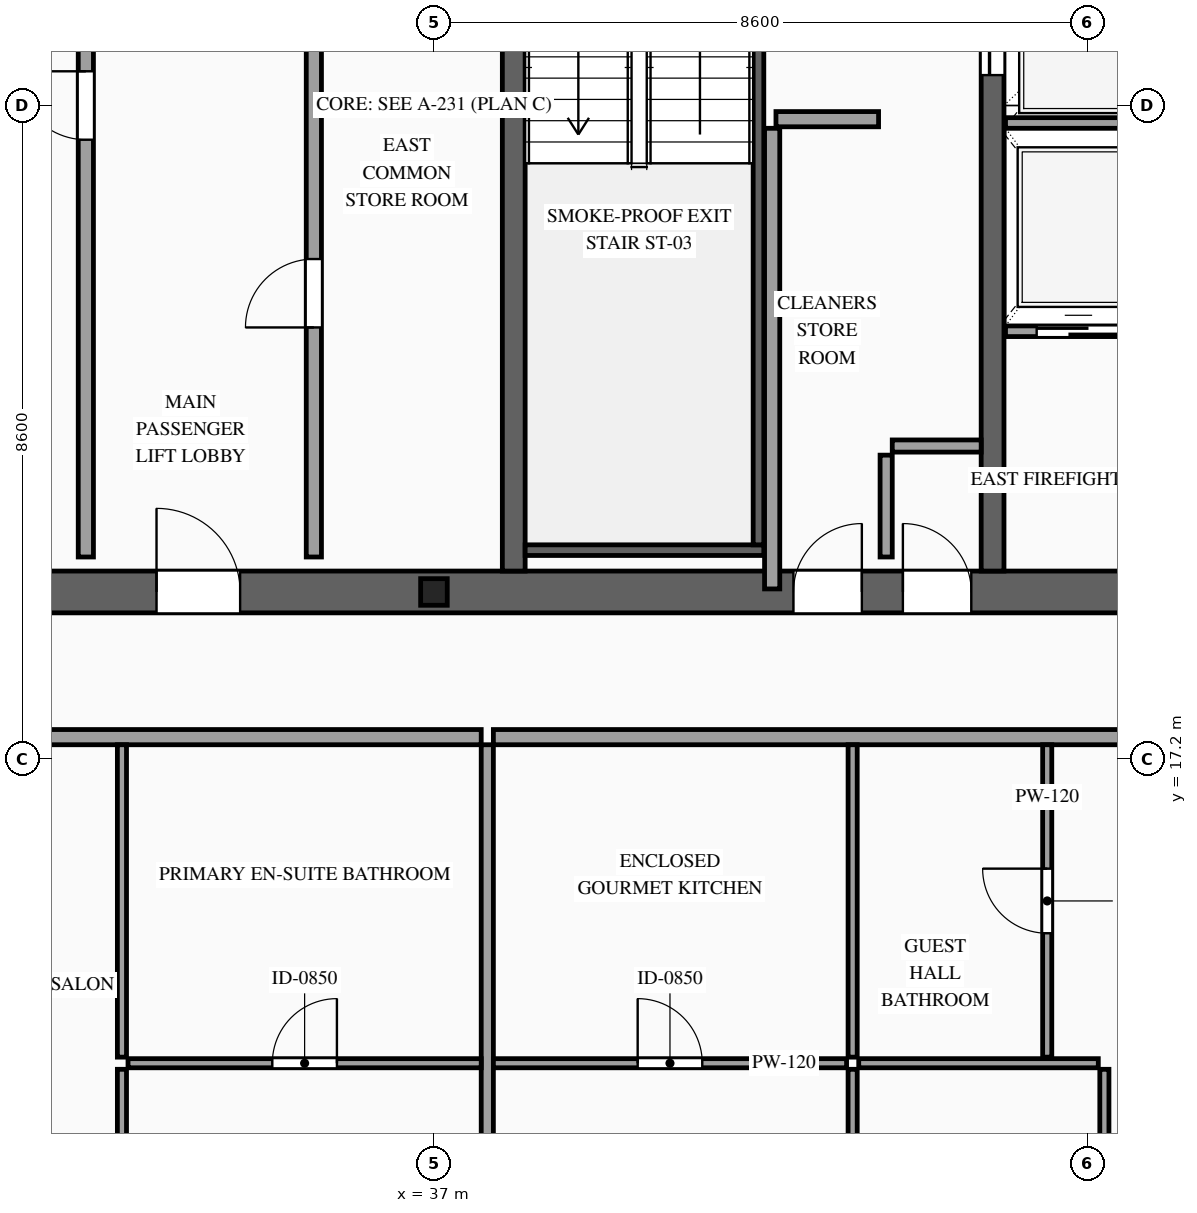
"""IFC4 building model, lengths in metres.
Left out: names, types, materials, properties, quantities, classifications, styles, units other than length and angle.
Written with IfcOpenShell. Run it as: python <this file> out.ifc"""

import sys

from ifc_helpers import new_model, si_unit, direction, frame, frame_2d, origin, origin_2d, place, context, subcontext, project, spatial, rectangle, i_section, extrude, source, transform, mapped, element, fill, save


model = new_model("IFC4")
c1 = context("Model", 3, precision=1e-05, world=origin(), true_north=direction((0.0, 1.0)))
c2 = subcontext(c1, "Body", "Model", "MODEL_VIEW")
j1 = project(units=[si_unit("LENGTHUNIT", "METRE"), si_unit("PLANEANGLEUNIT", "RADIAN")], contexts=[c1])
p1 = place(None, origin())
s1 = spatial("IfcSite", under=j1, at=p1, CompositionType="ELEMENT")
p2 = place(p1, origin())
s2 = spatial("IfcBuilding", under=s1, at=p2, CompositionType="ELEMENT")
p3 = place(p2, frame((0.0, 0.0, 282.1)))
s3 = spatial("IfcBuildingStorey", under=s2, at=p3, CompositionType="ELEMENT", Elevation=282.1)
p4 = place(p3, frame((23.525, 19.4, 0.0), z_axis=(0.0, 0.0, 1.0), x_axis=(1.0, 0.0, 0.0)))
e1 = element("IfcWall", 1, at=p4, inside=s3, PredefinedType="SHEAR", context=c2, shape_type="SweptSolid", body=[
    extrude(rectangle(XDim=26.95, YDim=0.55, at=frame_2d((13.475, 0.0))), origin(), (0.0, 0.0, 1.0), 3.5),
])
p5 = place(p4, frame((1.925, 0.0, 0.0)))
e2 = element("IfcOpeningElement", 2, at=p5, cuts=e1, PredefinedType="OPENING", context=c2, shape_type="SweptSolid", body=[
    extrude(rectangle(XDim=1.1, YDim=2.2, at=frame_2d((0.55, 1.1))), frame((0.0, 0.29, 0.0), z_axis=(0.0, -1.0, 0.0), x_axis=(1.0, 0.0, 0.0)), (0.0, 0.0, 1.0), 0.58),
])
p6 = place(p4, frame((9.825, 0.0, 0.0)))
e3 = element("IfcOpeningElement", 3, at=p6, cuts=e1, PredefinedType="OPENING", context=c2, shape_type="SweptSolid", body=[
    extrude(rectangle(XDim=1.1, YDim=2.2, at=frame_2d((0.55, 1.1))), frame((0.0, 0.29, 0.0), z_axis=(0.0, -1.0, 0.0), x_axis=(1.0, 0.0, 0.0)), (0.0, 0.0, 1.0), 0.58),
])
p7 = place(p4, frame((23.025, 0.0, 0.0)))
e4 = element("IfcOpeningElement", 4, at=p7, cuts=e1, PredefinedType="OPENING", context=c2, shape_type="SweptSolid", body=[
    extrude(rectangle(XDim=1.1, YDim=2.2, at=frame_2d((0.55, 1.1))), frame((0.0, 0.29, 0.0), z_axis=(0.0, -1.0, 0.0), x_axis=(1.0, 0.0, 0.0)), (0.0, 0.0, 1.0), 0.58),
])
p8 = place(p4, frame((19.645, 0.0, 0.0)))
e5 = element("IfcOpeningElement", 5, at=p8, cuts=e1, PredefinedType="OPENING", context=c2, shape_type="SweptSolid", body=[
    extrude(rectangle(XDim=0.9, YDim=2.15, at=frame_2d((0.45, 1.075))), frame((0.0, 0.29, 0.0), z_axis=(0.0, -1.0, 0.0), x_axis=(1.0, 0.0, 0.0)), (0.0, 0.0, 1.0), 0.58),
])
p9 = place(p4, frame((18.205, 0.0, 0.0)))
e6 = element("IfcOpeningElement", 6, at=p9, cuts=e1, PredefinedType="OPENING", context=c2, shape_type="SweptSolid", body=[
    extrude(rectangle(XDim=0.9, YDim=2.15, at=frame_2d((0.45, 1.075))), frame((0.0, 0.29, 0.0), z_axis=(0.0, -1.0, 0.0), x_axis=(1.0, 0.0, 0.0)), (0.0, 0.0, 1.0), 0.58),
])
m1 = source(origin(), c2, "Body", "SweptSolid", [
    extrude(rectangle(XDim=12.25, YDim=0.3, at=frame_2d((6.125, 0.0))), origin(), (0.0, 0.0, 1.0), 3.5),
])
p10 = place(p3, frame((38.05, 19.675, 0.0), z_axis=(0.0, 0.0, 1.0), x_axis=(0.0, 1.0, 0.0)))
e7 = element("IfcWall", 7, at=p10, inside=s3, PredefinedType="SOLIDWALL", context=c2, shape_type="MappedRepresentation", body=[
    mapped(m1, transform((0.0, 0.0, 0.0), scale=1.0)),
])
p11 = place(p3, frame((44.35, 19.675, 0.0), z_axis=(0.0, 0.0, 1.0), x_axis=(0.0, 1.0, 0.0)))
e8 = element("IfcWall", 8, at=p11, inside=s3, PredefinedType="SOLIDWALL", context=c2, shape_type="SweptSolid", body=[
    extrude(rectangle(XDim=12.25, YDim=0.3, at=frame_2d((6.125, 0.0))), origin(), (0.0, 0.0, 1.0), 3.5),
])
p12 = place(p11, frame((6.525, 0.0, 0.0)))
e9 = element("IfcOpeningElement", 9, at=p12, cuts=e8, PredefinedType="OPENING", context=c2, shape_type="SweptSolid", body=[
    extrude(rectangle(XDim=1.1, YDim=2.2, at=frame_2d((0.55, 1.1))), frame((0.0, 0.165, 0.0), z_axis=(0.0, -1.0, 0.0), x_axis=(1.0, 0.0, 0.0)), (0.0, 0.0, 1.0), 0.33),
])
p13 = place(p11, frame((8.625, 0.0, 0.0)))
e10 = element("IfcOpeningElement", 10, at=p13, cuts=e8, PredefinedType="OPENING", context=c2, shape_type="SweptSolid", body=[
    extrude(rectangle(XDim=1.1, YDim=2.2, at=frame_2d((0.55, 1.1))), frame((0.0, 0.165, 0.0), z_axis=(0.0, -1.0, 0.0), x_axis=(1.0, 0.0, 0.0)), (0.0, 0.0, 1.0), 0.33),
])
p14 = place(p11, frame((10.725, 0.0, 0.0)))
e11 = element("IfcOpeningElement", 11, at=p14, cuts=e8, PredefinedType="OPENING", context=c2, shape_type="SweptSolid", body=[
    extrude(rectangle(XDim=1.1, YDim=2.2, at=frame_2d((0.55, 1.1))), frame((0.0, 0.165, 0.0), z_axis=(0.0, -1.0, 0.0), x_axis=(1.0, 0.0, 0.0)), (0.0, 0.0, 1.0), 0.33),
])
m2 = source(origin(), c2, "Body", "SweptSolid", [
    extrude(i_section(OverallWidth=0.35, OverallDepth=0.35, WebThickness=0.012, FlangeThickness=0.019, at=origin_2d()), origin(), (0.0, 0.0, 1.0), 3.5),
])
p15 = place(p3, frame((37.0, 19.4, 0.0), z_axis=(0.0, 0.0, 1.0), x_axis=(1.0, 0.0, 0.0)))
e12 = element("IfcColumn", 12, at=p15, inside=s3, PredefinedType="COLUMN", context=c2, shape_type="MappedRepresentation", body=[
    mapped(m2, transform((0.0, 0.0, 0.0), scale=1.0)),
])
p16 = place(p3, frame((44.52, 22.83, 0.0), z_axis=(0.0, 0.0, 1.0), x_axis=(1.0, 0.0, 0.0)))
e13 = element("IfcWall", 13, at=p16, inside=s3, PredefinedType="SOLIDWALL", context=c2, shape_type="SweptSolid", body=[
    extrude(rectangle(XDim=1.92, YDim=0.14, at=frame_2d((0.96, 0.0))), origin(), (0.0, 0.0, 1.0), 3.28),
])
p17 = place(p16, frame((0.41, 0.0, 0.0)))
e14 = element("IfcOpeningElement", 14, at=p17, cuts=e13, PredefinedType="OPENING", context=c2, shape_type="SweptSolid", body=[
    extrude(rectangle(XDim=1.1, YDim=2.2, at=frame_2d((0.55, 1.1))), frame((0.0, 0.085, 0.0), z_axis=(0.0, -1.0, 0.0), x_axis=(1.0, 0.0, 0.0)), (0.0, 0.0, 1.0), 0.17),
])
m3 = source(origin(), c2, "Body", "SweptSolid", [
    extrude(rectangle(XDim=1.92, YDim=0.14, at=frame_2d((0.96, 0.0))), origin(), (0.0, 0.0, 1.0), 3.28),
])
p18 = place(p3, frame((44.52, 25.57, 0.0), z_axis=(0.0, 0.0, 1.0), x_axis=(1.0, 0.0, 0.0)))
e15 = element("IfcWall", 15, at=p18, inside=s3, PredefinedType="SOLIDWALL", context=c2, shape_type="MappedRepresentation", body=[
    mapped(m3, transform((0.0, 0.0, 0.0), scale=1.0)),
])
m4 = source(origin(), c2, "Body", "SweptSolid", [
    extrude(rectangle(XDim=3.14, YDim=0.14, at=frame_2d((1.57, 0.0))), origin(), (0.0, 0.0, 1.0), 3.28),
])
p19 = place(p3, frame((38.2, 19.95, 0.0), z_axis=(0.0, 0.0, 1.0), x_axis=(1.0, 0.0, 0.0)))
e16 = element("IfcWall", 16, at=p19, inside=s3, PredefinedType="SOLIDWALL", context=c2, shape_type="MappedRepresentation", body=[
    mapped(m4, transform((0.0, 0.0, 0.0), scale=1.0)),
])
m5 = source(origin(), c2, "Body", "SweptSolid", [
    extrude(rectangle(XDim=8.94, YDim=0.14, at=frame_2d((4.47, 0.0))), origin(), (0.0, 0.0, 1.0), 3.28),
])
p20 = place(p3, frame((41.27, 20.02, 0.0), z_axis=(0.0, 0.0, 1.0), x_axis=(0.0, 1.0, 0.0)))
e17 = element("IfcWall", 17, at=p20, inside=s3, PredefinedType="SOLIDWALL", context=c2, shape_type="MappedRepresentation", body=[
    mapped(m5, transform((0.0, 0.0, 0.0), scale=1.0)),
])
p21 = place(p3, frame((32.42, 19.86, 0.0), z_axis=(0.0, 0.0, 1.0), x_axis=(0.0, 1.0, 0.0)))
e18 = element("IfcWall", 18, at=p21, inside=s3, PredefinedType="PARTITIONING", context=c2, shape_type="SweptSolid", body=[
    extrude(rectangle(XDim=11.88, YDim=0.2, at=frame_2d((5.94, 0.0))), origin(), (0.0, 0.0, 1.0), 3.28),
])
p22 = place(p21, frame((5.49, 0.0, 0.0)))
e19 = element("IfcOpeningElement", 19, at=p22, cuts=e18, PredefinedType="OPENING", context=c2, shape_type="SweptSolid", body=[
    extrude(rectangle(XDim=0.9, YDim=2.15, at=frame_2d((0.45, 1.075))), frame((0.0, 0.115, 0.0), z_axis=(0.0, -1.0, 0.0), x_axis=(1.0, 0.0, 0.0)), (0.0, 0.0, 1.0), 0.23),
])
p23 = place(p3, frame((35.42, 19.86, 0.0), z_axis=(0.0, 0.0, 1.0), x_axis=(0.0, 1.0, 0.0)))
e20 = element("IfcWall", 20, at=p23, inside=s3, PredefinedType="PARTITIONING", context=c2, shape_type="SweptSolid", body=[
    extrude(rectangle(XDim=6.94, YDim=0.2, at=frame_2d((3.47, 0.0))), origin(), (0.0, 0.0, 1.0), 3.28),
])
p24 = place(p23, frame((3.02, 0.0, 0.0)))
e21 = element("IfcOpeningElement", 21, at=p24, cuts=e20, PredefinedType="OPENING", context=c2, shape_type="SweptSolid", body=[
    extrude(rectangle(XDim=0.9, YDim=2.15, at=frame_2d((0.45, 1.075))), frame((0.0, 0.115, 0.0), z_axis=(0.0, -1.0, 0.0), x_axis=(1.0, 0.0, 0.0)), (0.0, 0.0, 1.0), 0.23),
])
m6 = source(origin(), c2, "Body", "SweptSolid", [
    extrude(rectangle(XDim=1.34, YDim=0.16, at=frame_2d((0.67, 0.0))), origin(), (0.0, 0.0, 1.0), 3.28),
])
p25 = place(p3, frame((42.95, 19.86, 0.0), z_axis=(0.0, 0.0, 1.0), x_axis=(0.0, 1.0, 0.0)))
e22 = element("IfcWall", 22, at=p25, inside=s3, PredefinedType="PARTITIONING", context=c2, shape_type="MappedRepresentation", body=[
    mapped(m6, transform((0.0, 0.0, 0.0), scale=1.0)),
])
m7 = source(origin(), c2, "Body", "SweptSolid", [
    extrude(rectangle(XDim=1.17, YDim=0.16, at=frame_2d((0.585, 0.0))), origin(), (0.0, 0.0, 1.0), 3.28),
])
p26 = place(p3, frame((43.03, 21.32, 0.0), z_axis=(0.0, 0.0, 1.0), x_axis=(1.0, 0.0, 0.0)))
e23 = element("IfcWall", 23, at=p26, inside=s3, PredefinedType="PARTITIONING", context=c2, shape_type="MappedRepresentation", body=[
    mapped(m7, transform((0.0, 0.0, 0.0), scale=1.0)),
])
m8 = source(origin(), c2, "Body", "SweptSolid", [
    extrude(rectangle(XDim=6.06, YDim=0.2, at=frame_2d((3.03, 0.0))), origin(), (0.0, 0.0, 1.0), 3.28),
])
p27 = place(p3, frame((41.45, 19.44, 0.0), z_axis=(0.0, 0.0, 1.0), x_axis=(0.0, 1.0, 0.0)))
e24 = element("IfcWall", 24, at=p27, inside=s3, PredefinedType="PARTITIONING", context=c2, shape_type="MappedRepresentation", body=[
    mapped(m8, transform((0.0, 0.0, 0.0), scale=1.0)),
])
m9 = source(origin(), c2, "Body", "SweptSolid", [
    extrude(rectangle(XDim=1.35, YDim=0.2, at=frame_2d((0.675, 0.0))), origin(), (0.0, 0.0, 1.0), 3.28),
])
p28 = place(p3, frame((41.5, 25.62, 0.0), z_axis=(0.0, 0.0, 1.0), x_axis=(1.0, 0.0, 0.0)))
e25 = element("IfcWall", 25, at=p28, inside=s3, PredefinedType="PARTITIONING", context=c2, shape_type="MappedRepresentation", body=[
    mapped(m9, transform((0.0, 0.0, 0.0), scale=1.0)),
])
p29 = place(p3, frame((19.44, 17.49, 0.0), z_axis=(0.0, 0.0, 1.0), x_axis=(1.0, 0.0, 0.0)))
e26 = element("IfcWall", 26, at=p29, inside=s3, PredefinedType="PARTITIONING", context=c2, shape_type="SweptSolid", body=[
    extrude(rectangle(XDim=18.182, YDim=0.2, at=frame_2d((9.091, 0.0))), origin(), (0.0, 0.0, 1.0), 3.28),
])
p30 = place(p29, frame((10.528, 0.0, 0.0)))
e27 = element("IfcOpeningElement", 27, at=p30, cuts=e26, PredefinedType="OPENING", context=c2, shape_type="SweptSolid", body=[
    extrude(rectangle(XDim=1.0, YDim=2.2, at=frame_2d((0.5, 1.1))), frame((0.0, 0.115, 0.0), z_axis=(0.0, -1.0, 0.0), x_axis=(1.0, 0.0, 0.0)), (0.0, 0.0, 1.0), 0.23),
])
m10 = source(origin(), c2, "Body", "SweptSolid", [
    extrude(rectangle(XDim=12.04, YDim=0.16, at=frame_2d((6.02, 0.0))), origin(), (0.0, 0.0, 1.0), 3.28),
])
p31 = place(p3, frame((37.702, 5.35, 0.0), z_axis=(0.0, 0.0, 1.0), x_axis=(0.0, 1.0, 0.0)))
e28 = element("IfcWall", 28, at=p31, inside=s3, PredefinedType="PARTITIONING", context=c2, shape_type="MappedRepresentation", body=[
    mapped(m10, transform((0.0, 0.0, 0.0), scale=1.0)),
])
p32 = place(p3, frame((32.975, 13.2, 0.0), z_axis=(0.0, 0.0, 1.0), x_axis=(1.0, 0.0, 0.0)))
e29 = element("IfcWall", 29, at=p32, inside=s3, PredefinedType="PARTITIONING", context=c2, shape_type="SweptSolid", body=[
    extrude(rectangle(XDim=4.647, YDim=0.12, at=frame_2d((2.323, 0.0))), origin(), (0.0, 0.0, 1.0), 3.28),
])
p33 = place(p32, frame((1.898, 0.0, 0.0)))
e30 = element("IfcOpeningElement", 30, at=p33, cuts=e29, PredefinedType="OPENING", context=c2, shape_type="SweptSolid", body=[
    extrude(rectangle(XDim=0.85, YDim=2.1, at=frame_2d((0.425, 1.05))), frame((0.0, 0.075, 0.0), z_axis=(0.0, -1.0, 0.0), x_axis=(1.0, 0.0, 0.0)), (0.0, 0.0, 1.0), 0.15),
])
m11 = source(origin(), c2, "Body", "SweptSolid", [
    extrude(rectangle(XDim=4.11, YDim=0.12, at=frame_2d((2.055, 0.0))), origin(), (0.0, 0.0, 1.0), 3.28),
])
p34 = place(p3, frame((32.895, 13.28, 0.0), z_axis=(0.0, 0.0, 1.0), x_axis=(0.0, 1.0, 0.0)))
e31 = element("IfcWall", 31, at=p34, inside=s3, PredefinedType="PARTITIONING", context=c2, shape_type="MappedRepresentation", body=[
    mapped(m11, transform((0.0, 0.0, 0.0), scale=1.0)),
])
p35 = place(p3, frame((32.895, 5.35, 0.0), z_axis=(0.0, 0.0, 1.0), x_axis=(0.0, 1.0, 0.0)))
e32 = element("IfcWall", 32, at=p35, inside=s3, PredefinedType="PARTITIONING", context=c2, shape_type="SweptSolid", body=[
    extrude(rectangle(XDim=7.77, YDim=0.12, at=frame_2d((3.885, 0.0))), origin(), (0.0, 0.0, 1.0), 3.28),
])
p36 = place(p35, frame((3.435, 0.0, 0.0)))
e33 = element("IfcOpeningElement", 33, at=p36, cuts=e32, PredefinedType="OPENING", context=c2, shape_type="SweptSolid", body=[
    extrude(rectangle(XDim=0.9, YDim=2.15, at=frame_2d((0.45, 1.075))), frame((0.0, 0.075, 0.0), z_axis=(0.0, -1.0, 0.0), x_axis=(1.0, 0.0, 0.0)), (0.0, 0.0, 1.0), 0.15),
])
p37 = place(p3, frame((37.782, 17.49, 0.0), z_axis=(0.0, 0.0, 1.0), x_axis=(1.0, 0.0, 0.0)))
e34 = element("IfcWall", 34, at=p37, inside=s3, PredefinedType="PARTITIONING", context=c2, shape_type="SweptSolid", body=[
    extrude(rectangle(XDim=16.778, YDim=0.2, at=frame_2d((8.389, 0.0))), origin(), (0.0, 0.0, 1.0), 3.28),
])
p38 = place(p37, frame((9.545, 0.0, 0.0)))
e35 = element("IfcOpeningElement", 35, at=p38, cuts=e34, PredefinedType="OPENING", context=c2, shape_type="SweptSolid", body=[
    extrude(rectangle(XDim=1.0, YDim=2.2, at=frame_2d((0.5, 1.1))), frame((0.0, 0.115, 0.0), z_axis=(0.0, -1.0, 0.0), x_axis=(1.0, 0.0, 0.0)), (0.0, 0.0, 1.0), 0.23),
])
p39 = place(p3, frame((37.782, 13.2, 0.0), z_axis=(0.0, 0.0, 1.0), x_axis=(1.0, 0.0, 0.0)))
e36 = element("IfcWall", 36, at=p39, inside=s3, PredefinedType="PARTITIONING", context=c2, shape_type="SweptSolid", body=[
    extrude(rectangle(XDim=4.647, YDim=0.12, at=frame_2d((2.323, 0.0))), origin(), (0.0, 0.0, 1.0), 3.28),
])
p40 = place(p39, frame((1.898, 0.0, 0.0)))
e37 = element("IfcOpeningElement", 37, at=p40, cuts=e36, PredefinedType="OPENING", context=c2, shape_type="SweptSolid", body=[
    extrude(rectangle(XDim=0.85, YDim=2.1, at=frame_2d((0.425, 1.05))), frame((0.0, 0.075, 0.0), z_axis=(0.0, -1.0, 0.0), x_axis=(1.0, 0.0, 0.0)), (0.0, 0.0, 1.0), 0.15),
])
p41 = place(p3, frame((42.509, 13.28, 0.0), z_axis=(0.0, 0.0, 1.0), x_axis=(0.0, 1.0, 0.0)))
e38 = element("IfcWall", 38, at=p41, inside=s3, PredefinedType="PARTITIONING", context=c2, shape_type="MappedRepresentation", body=[
    mapped(m11, transform((0.0, 0.0, 0.0), scale=1.0)),
])
p42 = place(p3, frame((45.069, 13.28, 0.0), z_axis=(0.0, 0.0, 1.0), x_axis=(0.0, 1.0, 0.0)))
e39 = element("IfcWall", 39, at=p42, inside=s3, PredefinedType="PARTITIONING", context=c2, shape_type="SweptSolid", body=[
    extrude(rectangle(XDim=4.11, YDim=0.12, at=frame_2d((2.055, 0.0))), origin(), (0.0, 0.0, 1.0), 3.28),
])
p43 = place(p42, frame((1.63, 0.0, 0.0)))
e40 = element("IfcOpeningElement", 40, at=p43, cuts=e39, PredefinedType="OPENING", context=c2, shape_type="SweptSolid", body=[
    extrude(rectangle(XDim=0.85, YDim=2.1, at=frame_2d((0.425, 1.05))), frame((0.0, 0.075, 0.0), z_axis=(0.0, -1.0, 0.0), x_axis=(1.0, 0.0, 0.0)), (0.0, 0.0, 1.0), 0.15),
])
p44 = place(p3, frame((42.509, 5.35, 0.0), z_axis=(0.0, 0.0, 1.0), x_axis=(0.0, 1.0, 0.0)))
e41 = element("IfcWall", 41, at=p44, inside=s3, PredefinedType="PARTITIONING", context=c2, shape_type="SweptSolid", body=[
    extrude(rectangle(XDim=7.77, YDim=0.12, at=frame_2d((3.885, 0.0))), origin(), (0.0, 0.0, 1.0), 3.28),
])
p45 = place(p44, frame((3.435, 0.0, 0.0)))
e42 = element("IfcOpeningElement", 42, at=p45, cuts=e41, PredefinedType="OPENING", context=c2, shape_type="SweptSolid", body=[
    extrude(rectangle(XDim=0.9, YDim=2.15, at=frame_2d((0.45, 1.075))), frame((0.0, 0.075, 0.0), z_axis=(0.0, -1.0, 0.0), x_axis=(1.0, 0.0, 0.0)), (0.0, 0.0, 1.0), 0.15),
])
m12 = source(origin(), c2, "Body", "SweptSolid", [
    extrude(rectangle(XDim=3.152, YDim=0.12, at=frame_2d((1.576, 0.0))), origin(), (0.0, 0.0, 1.0), 3.28),
])
p46 = place(p3, frame((42.589, 13.2, 0.0), z_axis=(0.0, 0.0, 1.0), x_axis=(1.0, 0.0, 0.0)))
e43 = element("IfcWall", 43, at=p46, inside=s3, PredefinedType="PARTITIONING", context=c2, shape_type="MappedRepresentation", body=[
    mapped(m12, transform((0.0, 0.0, 0.0), scale=1.0)),
])
p47 = place(p3, frame((45.821, 5.35, 0.0), z_axis=(0.0, 0.0, 1.0), x_axis=(0.0, 1.0, 0.0)))
e44 = element("IfcWall", 44, at=p47, inside=s3, PredefinedType="PARTITIONING", context=c2, shape_type="SweptSolid", body=[
    extrude(rectangle(XDim=7.77, YDim=0.12, at=frame_2d((3.885, 0.0))), origin(), (0.0, 0.0, 1.0), 3.28),
])
p48 = place(p47, frame((3.435, 0.0, 0.0)))
e45 = element("IfcOpeningElement", 45, at=p48, cuts=e44, PredefinedType="OPENING", context=c2, shape_type="SweptSolid", body=[
    extrude(rectangle(XDim=0.9, YDim=2.15, at=frame_2d((0.45, 1.075))), frame((0.0, 0.075, 0.0), z_axis=(0.0, -1.0, 0.0), x_axis=(1.0, 0.0, 0.0)), (0.0, 0.0, 1.0), 0.15),
])
m13 = source(origin(), c2, "Body", "SweptSolid", [
    extrude(rectangle(XDim=1.1, YDim=2.2, at=frame_2d((0.55, 1.1))), frame((0.0, 0.025, 0.0), z_axis=(0.0, -1.0, 0.0), x_axis=(1.0, 0.0, 0.0)), (0.0, 0.0, 1.0), 0.05),
])
p49 = place(p17, origin())
e46 = element("IfcDoor", 46, at=p49, inside=s3, OperationType="SLIDING_TO_RIGHT", PredefinedType="DOOR", context=c2, shape_type="MappedRepresentation", body=[
    mapped(m13, transform((0.0, 0.0, 0.0), scale=1.0)),
])
fill(e14, e46)
p50 = place(p12, origin())
e47 = element("IfcDoor", 47, at=p50, inside=s3, OperationType="SLIDING_TO_LEFT", PredefinedType="DOOR", context=c2, shape_type="MappedRepresentation", body=[
    mapped(m13, transform((0.0, 0.0, 0.0), scale=1.0)),
])
fill(e9, e47)
m14 = source(origin(), c2, "Body", "SweptSolid", [
    extrude(rectangle(XDim=1.1, YDim=2.2, at=frame_2d((0.55, 1.1))), frame((0.0, 0.025, 0.0), z_axis=(0.0, -1.0, 0.0), x_axis=(1.0, 0.0, 0.0)), (0.0, 0.0, 1.0), 0.05),
])
p51 = place(p6, origin())
e48 = element("IfcDoor", 48, at=p51, inside=s3, OperationType="SINGLE_SWING_LEFT", PredefinedType="DOOR", context=c2, shape_type="MappedRepresentation", body=[
    mapped(m14, transform((0.0, 0.0, 0.0), scale=1.0)),
])
fill(e3, e48)
m15 = source(origin(), c2, "Body", "SweptSolid", [
    extrude(rectangle(XDim=0.9, YDim=2.15, at=frame_2d((0.45, 1.075))), frame((0.0, 0.025, 0.0), z_axis=(0.0, -1.0, 0.0), x_axis=(1.0, 0.0, 0.0)), (0.0, 0.0, 1.0), 0.05),
])
p52 = place(p22, origin())
e49 = element("IfcDoor", 49, at=p52, inside=s3, OperationType="SINGLE_SWING_RIGHT", PredefinedType="DOOR", context=c2, shape_type="MappedRepresentation", body=[
    mapped(m15, transform((0.0, 0.0, 0.0), scale=1.0)),
])
fill(e19, e49)
p53 = place(p24, origin())
e50 = element("IfcDoor", 50, at=p53, inside=s3, OperationType="SINGLE_SWING_LEFT", PredefinedType="DOOR", context=c2, shape_type="MappedRepresentation", body=[
    mapped(m15, transform((0.0, 0.0, 0.0), scale=1.0)),
])
fill(e21, e50)
p54 = place(p8, origin())
e51 = element("IfcDoor", 51, at=p54, inside=s3, OperationType="SINGLE_SWING_LEFT", PredefinedType="DOOR", context=c2, shape_type="MappedRepresentation", body=[
    mapped(m15, transform((0.0, 0.0, 0.0), scale=1.0)),
])
fill(e5, e51)
p55 = place(p9, origin())
e52 = element("IfcDoor", 52, at=p55, inside=s3, OperationType="SINGLE_SWING_RIGHT", PredefinedType="DOOR", context=c2, shape_type="MappedRepresentation", body=[
    mapped(m15, transform((0.0, 0.0, 0.0), scale=1.0)),
])
fill(e6, e52)
m16 = source(origin(), c2, "Body", "SweptSolid", [
    extrude(rectangle(XDim=0.85, YDim=2.1, at=frame_2d((0.425, 1.05))), frame((0.0, 0.025, 0.0), z_axis=(0.0, -1.0, 0.0), x_axis=(1.0, 0.0, 0.0)), (0.0, 0.0, 1.0), 0.05),
])
p56 = place(p33, origin())
e53 = element("IfcDoor", 53, at=p56, inside=s3, OperationType="SINGLE_SWING_RIGHT", PredefinedType="DOOR", context=c2, shape_type="MappedRepresentation", body=[
    mapped(m16, transform((0.0, 0.0, 0.0), scale=1.0)),
])
fill(e30, e53)
p57 = place(p40, origin())
e54 = element("IfcDoor", 54, at=p57, inside=s3, OperationType="SINGLE_SWING_LEFT", PredefinedType="DOOR", context=c2, shape_type="MappedRepresentation", body=[
    mapped(m16, transform((0.0, 0.0, 0.0), scale=1.0)),
])
fill(e37, e54)
p58 = place(p43, origin())
e55 = element("IfcDoor", 55, at=p58, inside=s3, OperationType="SINGLE_SWING_RIGHT", PredefinedType="DOOR", context=c2, shape_type="MappedRepresentation", body=[
    mapped(m16, transform((0.0, 0.0, 0.0), scale=1.0)),
])
fill(e40, e55)
save(model, sys.argv[1])
